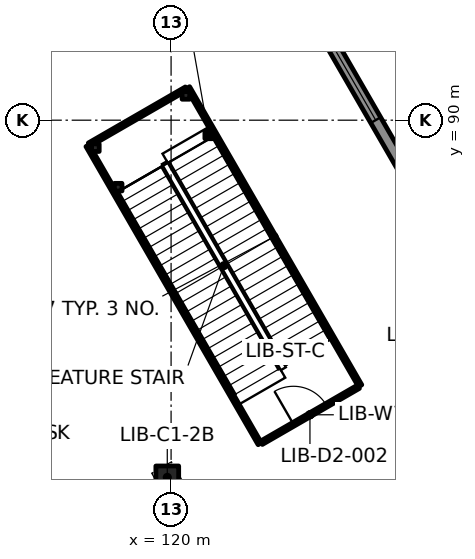
"""IFC4 building model, lengths in metres.
Left out: names, types, materials, properties, quantities, classifications, styles, units other than length and angle.
Written with IfcOpenShell. Run it as: python <this file> out.ifc"""

import sys

from ifc_helpers import new_model, si_unit, direction, frame, frame_2d, origin, origin_2d, place, context, subcontext, project, spatial, rectangle, extrude, element, fill, save


model = new_model("IFC4")
c1 = context("Model", 3, precision=1e-05, world=origin(), true_north=direction((0.0, 1.0)))
c2 = subcontext(c1, "Body", "Model", "MODEL_VIEW")
j1 = project(units=[si_unit("LENGTHUNIT", "METRE"), si_unit("PLANEANGLEUNIT", "RADIAN")], contexts=[c1])
p1 = place(None, origin())
s1 = spatial("IfcSite", under=j1, at=p1, CompositionType="ELEMENT")
p2 = place(p1, origin())
s2 = spatial("IfcBuilding", under=s1, at=p2, CompositionType="ELEMENT")
p3 = place(p2, origin())
s3 = spatial("IfcBuildingStorey", under=s2, at=p3, CompositionType="ELEMENT", Elevation=0.0)
p4 = place(p3, frame((119.9, 80.6, -0.3), z_axis=(0.0, 0.0, 1.0), x_axis=(1.0, 0.0, 0.0)))
e1 = element("IfcColumn", 1, at=p4, inside=s3, PredefinedType="COLUMN", context=c2, shape_type="SweptSolid", body=[
    extrude(rectangle(XDim=0.6, YDim=0.6, at=origin_2d()), origin(), (0.0, 0.0, 1.0), 7.94),
])
for number, where, z_axis, x_axis in (
    (2, (120.99, 89.613, 0.0), (0.0, 0.0, 1.0), (1.0, 0.0, 0.0)),
    (3, (118.608, 88.238, 0.0), (0.0, 0.0, 1.0), (1.0, 0.0, 0.0)),
    (4, (120.39, 90.652, 0.0), (0.0, 0.0, 1.0), (1.0, 0.0, 0.0)),
    (5, (118.008, 89.277, 0.0), (0.0, 0.0, 1.0), (1.0, 0.0, 0.0)),
):
    element("IfcColumn", number, at=place(p3, frame(where, z_axis=z_axis, x_axis=x_axis)), inside=s3, PredefinedType="COLUMN", context=c2, shape_type="SweptSolid", body=[
        extrude(rectangle(XDim=0.2, YDim=0.2, at=origin_2d()), origin(), (0.0, 0.0, 1.0), 3.8),
    ])
p5 = place(p3, frame((132.784, 77.185, 0.0), z_axis=(0.0, 0.0, 1.0), x_axis=(-0.49999992739, 0.866025445706, 0.0)))
e6 = element("IfcWall", 6, at=p5, inside=s3, PredefinedType="SOLIDWALL", context=c2, shape_type="SweptSolid", body=[
    extrude(rectangle(XDim=54.0, YDim=0.3, at=frame_2d((27.0, 0.0))), origin(), (0.0, 0.0, 1.0), 7.64),
])
p6 = place(p5, frame((1.6, 0.0, 0.6)))
e7 = element("IfcOpeningElement", 7, at=p6, cuts=e6, PredefinedType="OPENING", context=c2, shape_type="SweptSolid", body=[
    extrude(rectangle(XDim=2.4, YDim=4.6, at=frame_2d((1.2, 2.3))), frame((0.0, 0.16, 0.0), z_axis=(0.0, -1.0, 0.0), x_axis=(1.0, 0.0, 0.0)), (0.0, 0.0, 1.0), 0.32),
])
p7 = place(p5, frame((6.0, 0.0, 0.6)))
e8 = element("IfcOpeningElement", 8, at=p7, cuts=e6, PredefinedType="OPENING", context=c2, shape_type="SweptSolid", body=[
    extrude(rectangle(XDim=2.4, YDim=4.6, at=frame_2d((1.2, 2.3))), frame((0.0, 0.16, 0.0), z_axis=(0.0, -1.0, 0.0), x_axis=(1.0, 0.0, 0.0)), (0.0, 0.0, 1.0), 0.32),
])
p8 = place(p5, frame((10.4, 0.0, 0.6)))
e9 = element("IfcOpeningElement", 9, at=p8, cuts=e6, PredefinedType="OPENING", context=c2, shape_type="SweptSolid", body=[
    extrude(rectangle(XDim=2.4, YDim=4.6, at=frame_2d((1.2, 2.3))), frame((0.0, 0.16, 0.0), z_axis=(0.0, -1.0, 0.0), x_axis=(1.0, 0.0, 0.0)), (0.0, 0.0, 1.0), 0.32),
])
p9 = place(p5, frame((14.8, 0.0, 0.6)))
e10 = element("IfcOpeningElement", 10, at=p9, cuts=e6, PredefinedType="OPENING", context=c2, shape_type="SweptSolid", body=[
    extrude(rectangle(XDim=2.4, YDim=4.6, at=frame_2d((1.2, 2.3))), frame((0.0, 0.16, 0.0), z_axis=(0.0, -1.0, 0.0), x_axis=(1.0, 0.0, 0.0)), (0.0, 0.0, 1.0), 0.32),
])
p10 = place(p5, frame((19.2, 0.0, 0.6)))
e11 = element("IfcOpeningElement", 11, at=p10, cuts=e6, PredefinedType="OPENING", context=c2, shape_type="SweptSolid", body=[
    extrude(rectangle(XDim=2.4, YDim=4.6, at=frame_2d((1.2, 2.3))), frame((0.0, 0.16, 0.0), z_axis=(0.0, -1.0, 0.0), x_axis=(1.0, 0.0, 0.0)), (0.0, 0.0, 1.0), 0.32),
])
p11 = place(p5, frame((23.6, 0.0, 0.6)))
e12 = element("IfcOpeningElement", 12, at=p11, cuts=e6, PredefinedType="OPENING", context=c2, shape_type="SweptSolid", body=[
    extrude(rectangle(XDim=2.4, YDim=4.6, at=frame_2d((1.2, 2.3))), frame((0.0, 0.16, 0.0), z_axis=(0.0, -1.0, 0.0), x_axis=(1.0, 0.0, 0.0)), (0.0, 0.0, 1.0), 0.32),
])
p12 = place(p5, frame((28.0, 0.0, 0.6)))
e13 = element("IfcOpeningElement", 13, at=p12, cuts=e6, PredefinedType="OPENING", context=c2, shape_type="SweptSolid", body=[
    extrude(rectangle(XDim=2.4, YDim=4.6, at=frame_2d((1.2, 2.3))), frame((0.0, 0.16, 0.0), z_axis=(0.0, -1.0, 0.0), x_axis=(1.0, 0.0, 0.0)), (0.0, 0.0, 1.0), 0.32),
])
p13 = place(p5, frame((32.4, 0.0, 0.6)))
e14 = element("IfcOpeningElement", 14, at=p13, cuts=e6, PredefinedType="OPENING", context=c2, shape_type="SweptSolid", body=[
    extrude(rectangle(XDim=2.4, YDim=4.6, at=frame_2d((1.2, 2.3))), frame((0.0, 0.16, 0.0), z_axis=(0.0, -1.0, 0.0), x_axis=(1.0, 0.0, 0.0)), (0.0, 0.0, 1.0), 0.32),
])
p14 = place(p5, frame((36.8, 0.0, 0.6)))
e15 = element("IfcOpeningElement", 15, at=p14, cuts=e6, PredefinedType="OPENING", context=c2, shape_type="SweptSolid", body=[
    extrude(rectangle(XDim=2.4, YDim=4.6, at=frame_2d((1.2, 2.3))), frame((0.0, 0.16, 0.0), z_axis=(0.0, -1.0, 0.0), x_axis=(1.0, 0.0, 0.0)), (0.0, 0.0, 1.0), 0.32),
])
p15 = place(p5, frame((46.35, 0.0, 0.0)))
e16 = element("IfcOpeningElement", 16, at=p15, cuts=e6, PredefinedType="OPENING", context=c2, shape_type="SweptSolid", body=[
    extrude(rectangle(XDim=1.2, YDim=2.2, at=frame_2d((0.6, 1.1))), frame((0.0, 0.16, 0.0), z_axis=(0.0, -1.0, 0.0), x_axis=(1.0, 0.0, 0.0)), (0.0, 0.0, 1.0), 0.32),
])
p16 = place(p3, frame((101.392, 85.157, 0.0), z_axis=(0.0, 0.0, 1.0), x_axis=(0.866022961126, 0.500004230785, 0.0)))
e17 = element("IfcWall", 17, at=p16, inside=s3, PredefinedType="PARTITIONING", context=c2, shape_type="SweptSolid", body=[
    extrude(rectangle(XDim=23.05, YDim=0.15, at=frame_2d((11.525, 0.0))), origin(), (0.0, 0.0, 1.0), 7.64),
])
for number, where, z_axis, x_axis in (
    (18, (122.333, 81.486, 0.0), (0.0, 0.0, 1.0), (-0.5, 0.866, 0.0)),
    (19, (124.975, 83.01, 0.0), (0.0, 0.0, 1.0), (-0.5, 0.866, 0.0)),
):
    element("IfcWall", number, at=place(p3, frame(where, z_axis=z_axis, x_axis=x_axis)), inside=s3, PredefinedType="PARTITIONING", context=c2, shape_type="SweptSolid", body=[
        extrude(rectangle(XDim=9.06, YDim=0.1, at=frame_2d((4.53, 0.0))), origin(), (0.0, 0.0, 1.0), 7.64),
    ])
p17 = place(p3, frame((122.377, 81.51, 0.0), z_axis=(0.0, 0.0, 1.0), x_axis=(0.866003658127, 0.500037662692, 0.0)))
e20 = element("IfcWall", 20, at=p17, inside=s3, PredefinedType="PARTITIONING", context=c2, shape_type="SweptSolid", body=[
    extrude(rectangle(XDim=2.95, YDim=0.1, at=frame_2d((1.475, 0.0))), origin(), (0.0, 0.0, 1.0), 7.64),
])
p18 = place(p17, frame((0.975, 0.0, 0.0)))
e21 = element("IfcOpeningElement", 21, at=p18, cuts=e20, PredefinedType="OPENING", context=c2, shape_type="SweptSolid", body=[
    extrude(rectangle(XDim=1.0, YDim=2.1, at=frame_2d((0.5, 1.05))), frame((0.0, 0.06, 0.0), z_axis=(0.0, -1.0, 0.0), x_axis=(1.0, 0.0, 0.0)), (0.0, 0.0, 1.0), 0.12),
])
p19 = place(p3, frame((117.847, 89.357, 0.0), z_axis=(0.0, 0.0, 1.0), x_axis=(0.866003658127, 0.500037662692, 0.0)))
e22 = element("IfcWall", 22, at=p19, inside=s3, PredefinedType="PARTITIONING", context=c2, shape_type="SweptSolid", body=[
    extrude(rectangle(XDim=2.95, YDim=0.1, at=frame_2d((1.475, 0.0))), origin(), (0.0, 0.0, 1.0), 7.64),
])
p20 = place(p9, origin())
e23 = element("IfcWindow", 23, at=p20, inside=s3, PartitioningType="SINGLE_PANEL", PredefinedType="WINDOW", context=c2, shape_type="SweptSolid", body=[
    extrude(rectangle(XDim=2.4, YDim=4.6, at=frame_2d((1.2, 2.3))), frame((0.0, 0.03, 0.0), z_axis=(0.0, -1.0, 0.0), x_axis=(1.0, 0.0, 0.0)), (0.0, 0.0, 1.0), 0.06),
])
fill(e10, e23)
p21 = place(p18, origin())
e24 = element("IfcDoor", 24, at=p21, inside=s3, OperationType="SINGLE_SWING_LEFT", PredefinedType="DOOR", context=c2, shape_type="SweptSolid", body=[
    extrude(rectangle(XDim=1.0, YDim=2.1, at=frame_2d((0.5, 1.05))), frame((0.0, 0.025, 0.0), z_axis=(0.0, -1.0, 0.0), x_axis=(1.0, 0.0, 0.0)), (0.0, 0.0, 1.0), 0.05),
])
fill(e21, e24)
save(model, sys.argv[1])
